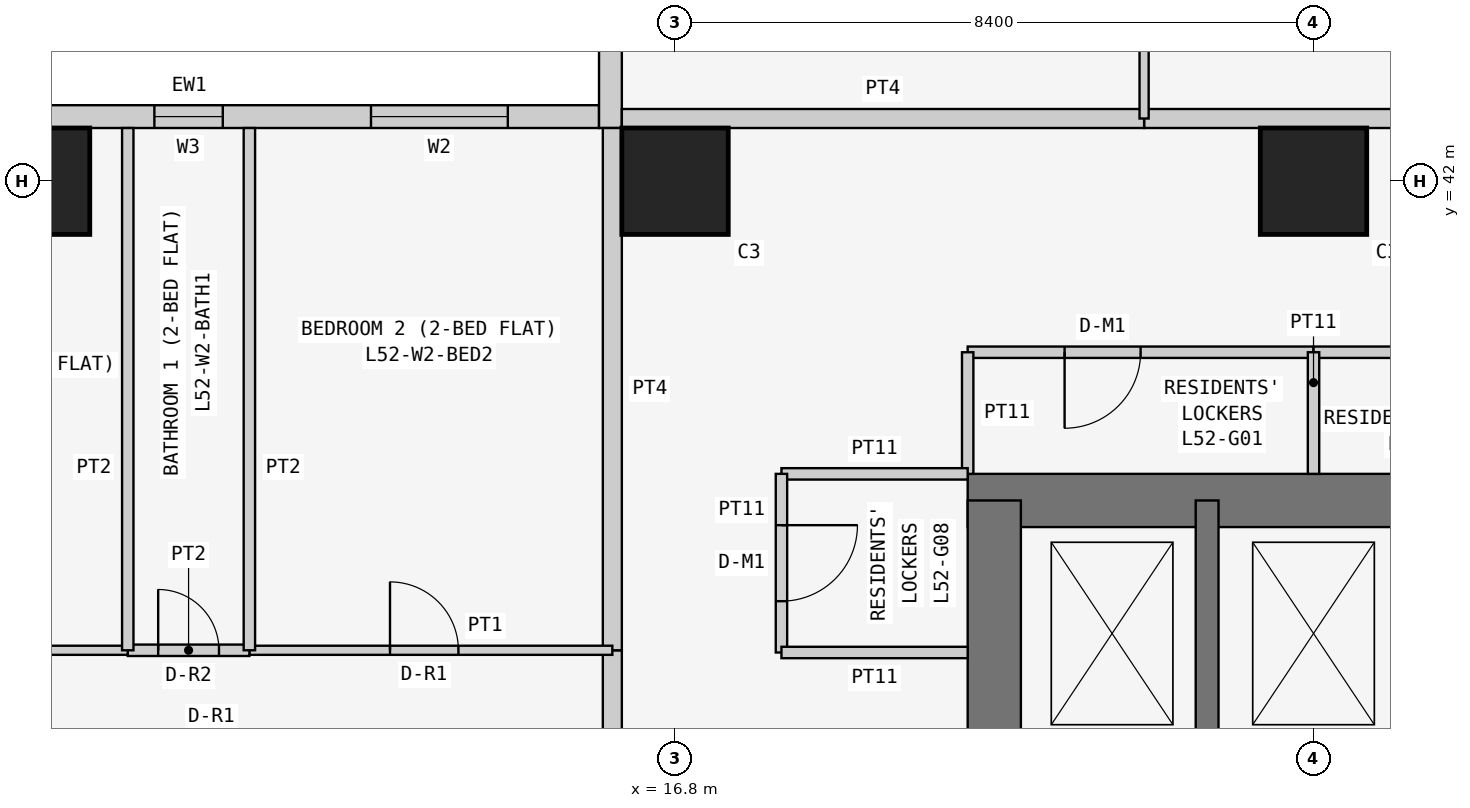
"""IFC4 building model, lengths in metres.
Left out: names, types, materials, properties, quantities, classifications, styles, units other than length and angle.
Written with IfcOpenShell. Run it as: python <this file> out.ifc"""

import sys

from ifc_helpers import new_model, si_unit, direction, frame, frame_2d, origin, origin_2d, place, context, subcontext, project, spatial, rectangle, extrude, element, fill, save


model = new_model("IFC4")
c1 = context("Model", 3, precision=1e-05, world=origin(), true_north=direction((0.0, 1.0)))
c2 = subcontext(c1, "Body", "Model", "MODEL_VIEW")
j1 = project(units=[si_unit("LENGTHUNIT", "METRE"), si_unit("PLANEANGLEUNIT", "RADIAN")], contexts=[c1])
p1 = place(None, origin())
s1 = spatial("IfcSite", under=j1, at=p1, CompositionType="ELEMENT")
p2 = place(p1, origin())
s2 = spatial("IfcBuilding", under=s1, at=p2, CompositionType="ELEMENT")
p3 = place(p2, frame((0.0, 0.0, 201.3)))
s3 = spatial("IfcBuildingStorey", under=s2, at=p3, CompositionType="ELEMENT", Elevation=201.3)
for number, where, z_axis, x_axis in (
    (1, (8.4, 42.0, 0.0), (0.0, 0.0, 1.0), (1.0, 0.0, 0.0)),
    (2, (16.8, 42.0, 0.0), (0.0, 0.0, 1.0), (1.0, 0.0, 0.0)),
    (3, (25.2, 42.0, 0.0), (0.0, 0.0, 1.0), (1.0, 0.0, 0.0)),
):
    element("IfcColumn", number, at=place(p3, frame(where, z_axis=z_axis, x_axis=x_axis)), inside=s3, PredefinedType="COLUMN", context=c2, shape_type="SweptSolid", body=[
        extrude(rectangle(XDim=1.4, YDim=1.4, at=origin_2d()), origin(), (0.0, 0.0, 1.0), 3.6),
    ])
p4 = place(p3, frame((37.8, 37.8, 0.0), z_axis=(0.0, 0.0, 1.0), x_axis=(-1.0, 0.0, 0.0)))
e4 = element("IfcWall", 4, at=p4, inside=s3, PredefinedType="SHEAR", context=c2, shape_type="SweptSolid", body=[
    extrude(rectangle(XDim=17.15, YDim=0.7, at=frame_2d((8.575, 0.0))), origin(), (0.0, 0.0, 1.0), 3.6),
])
p5 = place(p3, frame((21.0, 37.8, 0.0), z_axis=(0.0, 0.0, 1.0), x_axis=(0.0, -1.0, 0.0)))
e5 = element("IfcWall", 5, at=p5, inside=s3, PredefinedType="SHEAR", context=c2, shape_type="SweptSolid", body=[
    extrude(rectangle(XDim=17.15, YDim=0.7, at=frame_2d((8.575, 0.0))), origin(), (0.0, 0.0, 1.0), 3.6),
])
p6 = place(p5, frame((5.4, 0.0, 0.0)))
e6 = element("IfcOpeningElement", 6, at=p6, cuts=e5, PredefinedType="OPENING", context=c2, shape_type="SweptSolid", body=[
    extrude(rectangle(XDim=1.2, YDim=2.1, at=frame_2d((0.6, 1.05))), frame((0.0, 0.36, 0.0), z_axis=(0.0, -1.0, 0.0), x_axis=(1.0, 0.0, 0.0)), (0.0, 0.0, 1.0), 0.72),
])
p7 = place(p3, frame((23.8, 34.6, 0.0), z_axis=(0.0, 0.0, 1.0), x_axis=(0.0, 1.0, 0.0)))
e7 = element("IfcWall", 7, at=p7, inside=s3, PredefinedType="SHEAR", context=c2, shape_type="SweptSolid", body=[
    extrude(rectangle(XDim=3.2, YDim=0.3, at=frame_2d((1.6, 0.0))), origin(), (0.0, 0.0, 1.0), 3.6),
])
p8 = place(p3, frame((15.8, 42.85, 0.0), z_axis=(0.0, 0.0, 1.0), x_axis=(-1.0, 0.0, 0.0)))
e8 = element("IfcWall", 8, at=p8, inside=s3, PredefinedType="SOLIDWALL", context=c2, shape_type="SweptSolid", body=[
    extrude(rectangle(XDim=15.4, YDim=0.3, at=frame_2d((7.7, 0.0))), origin(), (0.0, 0.0, 1.0), 3.45),
])
p9 = place(p8, frame((1.2, 0.0, 0.9)))
e9 = element("IfcOpeningElement", 9, at=p9, cuts=e8, PredefinedType="OPENING", context=c2, shape_type="SweptSolid", body=[
    extrude(rectangle(XDim=1.8, YDim=1.5, at=frame_2d((0.9, 0.75))), frame((0.0, 0.16, 0.0), z_axis=(0.0, -1.0, 0.0), x_axis=(1.0, 0.0, 0.0)), (0.0, 0.0, 1.0), 0.32),
])
p10 = place(p8, frame((4.95, 0.0, 1.5)))
e10 = element("IfcOpeningElement", 10, at=p10, cuts=e8, PredefinedType="OPENING", context=c2, shape_type="SweptSolid", body=[
    extrude(rectangle(XDim=0.9, YDim=0.7, at=frame_2d((0.45, 0.35))), frame((0.0, 0.16, 0.0), z_axis=(0.0, -1.0, 0.0), x_axis=(1.0, 0.0, 0.0)), (0.0, 0.0, 1.0), 0.32),
])
p11 = place(p8, frame((8.5, 0.0, 0.9)))
e11 = element("IfcOpeningElement", 11, at=p11, cuts=e8, PredefinedType="OPENING", context=c2, shape_type="SweptSolid", body=[
    extrude(rectangle(XDim=1.8, YDim=1.5, at=frame_2d((0.9, 0.75))), frame((0.0, 0.16, 0.0), z_axis=(0.0, -1.0, 0.0), x_axis=(1.0, 0.0, 0.0)), (0.0, 0.0, 1.0), 0.32),
])
p12 = place(p8, frame((12.5, 0.0, 0.0)))
e12 = element("IfcOpeningElement", 12, at=p12, cuts=e8, PredefinedType="OPENING", context=c2, shape_type="SweptSolid", body=[
    extrude(rectangle(XDim=0.9, YDim=2.4, at=frame_2d((0.45, 1.2))), frame((0.0, 0.16, 0.0), z_axis=(0.0, -1.0, 0.0), x_axis=(1.0, 0.0, 0.0)), (0.0, 0.0, 1.0), 0.32),
])
p13 = place(p8, frame((13.5, 0.0, 0.9)))
e13 = element("IfcOpeningElement", 13, at=p13, cuts=e8, PredefinedType="OPENING", context=c2, shape_type="SweptSolid", body=[
    extrude(rectangle(XDim=1.2, YDim=1.5, at=frame_2d((0.6, 0.75))), frame((0.0, 0.16, 0.0), z_axis=(0.0, -1.0, 0.0), x_axis=(1.0, 0.0, 0.0)), (0.0, 0.0, 1.0), 0.32),
])
p14 = place(p3, frame((15.95, 50.0, 0.0), z_axis=(0.0, 0.0, 1.0), x_axis=(0.0, -1.0, 0.0)))
e14 = element("IfcWall", 14, at=p14, inside=s3, PredefinedType="SOLIDWALL", context=c2, shape_type="SweptSolid", body=[
    extrude(rectangle(XDim=7.3, YDim=0.3, at=frame_2d((3.65, 0.0))), origin(), (0.0, 0.0, 1.0), 3.45),
])
p15 = place(p14, frame((3.1, 0.0, 0.9)))
e15 = element("IfcOpeningElement", 15, at=p15, cuts=e14, PredefinedType="OPENING", context=c2, shape_type="SweptSolid", body=[
    extrude(rectangle(XDim=2.4, YDim=1.5, at=frame_2d((1.2, 0.75))), frame((0.0, 0.16, 0.0), z_axis=(0.0, -1.0, 0.0), x_axis=(1.0, 0.0, 0.0)), (0.0, 0.0, 1.0), 0.32),
])
p16 = place(p14, frame((0.75, 0.0, 0.9)))
e16 = element("IfcOpeningElement", 16, at=p16, cuts=e14, PredefinedType="OPENING", context=c2, shape_type="SweptSolid", body=[
    extrude(rectangle(XDim=1.2, YDim=1.5, at=frame_2d((0.6, 0.75))), frame((0.0, 0.16, 0.0), z_axis=(0.0, -1.0, 0.0), x_axis=(1.0, 0.0, 0.0)), (0.0, 0.0, 1.0), 0.32),
])
p17 = place(p3, frame((25.2, 39.75, 0.0), z_axis=(0.0, 0.0, 1.0), x_axis=(-1.0, 0.0, 0.0)))
e17 = element("IfcWall", 17, at=p17, inside=s3, PredefinedType="PARTITIONING", context=c2, shape_type="SweptSolid", body=[
    extrude(rectangle(XDim=4.55, YDim=0.15, at=frame_2d((2.275, 0.0))), origin(), (0.0, 0.0, 1.0), 3.45),
])
p18 = place(p17, frame((2.275, 0.0, 0.0)))
e18 = element("IfcOpeningElement", 18, at=p18, cuts=e17, PredefinedType="OPENING", context=c2, shape_type="SweptSolid", body=[
    extrude(rectangle(XDim=1.0, YDim=2.1, at=frame_2d((0.5, 1.05))), frame((0.0, 0.085, 0.0), z_axis=(0.0, -1.0, 0.0), x_axis=(1.0, 0.0, 0.0)), (0.0, 0.0, 1.0), 0.17),
])
p19 = place(p3, frame((20.65, 39.75, 0.0), z_axis=(0.0, 0.0, 1.0), x_axis=(0.0, -1.0, 0.0)))
e19 = element("IfcWall", 19, at=p19, inside=s3, PredefinedType="PARTITIONING", context=c2, shape_type="SweptSolid", body=[
    extrude(rectangle(XDim=1.6, YDim=0.15, at=frame_2d((0.8, 0.0))), origin(), (0.0, 0.0, 1.0), 3.45),
])
p20 = place(p3, frame((32.6, 39.75, 0.0), z_axis=(0.0, 0.0, 1.0), x_axis=(-1.0, 0.0, 0.0)))
e20 = element("IfcWall", 20, at=p20, inside=s3, PredefinedType="PARTITIONING", context=c2, shape_type="SweptSolid", body=[
    extrude(rectangle(XDim=7.4, YDim=0.15, at=frame_2d((3.7, 0.0))), origin(), (0.0, 0.0, 1.0), 3.45),
])
p21 = place(p20, frame((2.7, 0.0, 0.0)))
e21 = element("IfcOpeningElement", 21, at=p21, cuts=e20, PredefinedType="OPENING", context=c2, shape_type="SweptSolid", body=[
    extrude(rectangle(XDim=1.0, YDim=2.1, at=frame_2d((0.5, 1.05))), frame((0.0, 0.085, 0.0), z_axis=(0.0, -1.0, 0.0), x_axis=(1.0, 0.0, 0.0)), (0.0, 0.0, 1.0), 0.17),
])
p22 = place(p3, frame((20.65, 38.15, 0.0), z_axis=(0.0, 0.0, 1.0), x_axis=(-1.0, 0.0, 0.0)))
e22 = element("IfcWall", 22, at=p22, inside=s3, PredefinedType="PARTITIONING", context=c2, shape_type="SweptSolid", body=[
    extrude(rectangle(XDim=2.45, YDim=0.15, at=frame_2d((1.225, 0.0))), origin(), (0.0, 0.0, 1.0), 3.45),
])
p23 = place(p3, frame((18.2, 38.15, 0.0), z_axis=(0.0, 0.0, 1.0), x_axis=(0.0, -1.0, 0.0)))
e23 = element("IfcWall", 23, at=p23, inside=s3, PredefinedType="PARTITIONING", context=c2, shape_type="SweptSolid", body=[
    extrude(rectangle(XDim=2.35, YDim=0.15, at=frame_2d((1.175, 0.0))), origin(), (0.0, 0.0, 1.0), 3.45),
])
p24 = place(p23, frame((0.675, 0.0, 0.0)))
e24 = element("IfcOpeningElement", 24, at=p24, cuts=e23, PredefinedType="OPENING", context=c2, shape_type="SweptSolid", body=[
    extrude(rectangle(XDim=1.0, YDim=2.1, at=frame_2d((0.5, 1.05))), frame((0.0, 0.085, 0.0), z_axis=(0.0, -1.0, 0.0), x_axis=(1.0, 0.0, 0.0)), (0.0, 0.0, 1.0), 0.17),
])
p25 = place(p3, frame((18.2, 35.8, 0.0), z_axis=(0.0, 0.0, 1.0), x_axis=(1.0, 0.0, 0.0)))
e25 = element("IfcWall", 25, at=p25, inside=s3, PredefinedType="PARTITIONING", context=c2, shape_type="SweptSolid", body=[
    extrude(rectangle(XDim=2.45, YDim=0.15, at=frame_2d((1.225, 0.0))), origin(), (0.0, 0.0, 1.0), 3.45),
])
p26 = place(p3, frame((22.971, 42.825, 0.0), z_axis=(0.0, 0.0, 1.0), x_axis=(1.0, 0.0, 0.0)))
e26 = element("IfcWall", 26, at=p26, inside=s3, PredefinedType="PARTITIONING", context=c2, shape_type="SweptSolid", body=[
    extrude(rectangle(XDim=6.429, YDim=0.25, at=frame_2d((3.214, 0.0))), origin(), (0.0, 0.0, 1.0), 3.45),
])
p27 = place(p26, frame((4.929, 0.0, 0.0)))
e27 = element("IfcOpeningElement", 27, at=p27, cuts=e26, PredefinedType="OPENING", context=c2, shape_type="SweptSolid", body=[
    extrude(rectangle(XDim=1.0, YDim=2.1, at=frame_2d((0.5, 1.05))), frame((0.0, 0.135, 0.0), z_axis=(0.0, -1.0, 0.0), x_axis=(1.0, 0.0, 0.0)), (0.0, 0.0, 1.0), 0.27),
])
p28 = place(p3, frame((16.1, 42.825, 0.0), z_axis=(0.0, 0.0, 1.0), x_axis=(1.0, 0.0, 0.0)))
e28 = element("IfcWall", 28, at=p28, inside=s3, PredefinedType="PARTITIONING", context=c2, shape_type="SweptSolid", body=[
    extrude(rectangle(XDim=6.871, YDim=0.25, at=frame_2d((3.436, 0.0))), origin(), (0.0, 0.0, 1.0), 3.45),
])
p29 = place(p3, frame((15.975, 34.629, 0.0), z_axis=(0.0, 0.0, 1.0), x_axis=(0.0, 1.0, 0.0)))
e29 = element("IfcWall", 29, at=p29, inside=s3, PredefinedType="PARTITIONING", context=c2, shape_type="SweptSolid", body=[
    extrude(rectangle(XDim=1.2, YDim=0.25, at=frame_2d((0.6, 0.0))), origin(), (0.0, 0.0, 1.0), 3.45),
])
p30 = place(p3, frame((15.975, 35.829, 0.0), z_axis=(0.0, 0.0, 1.0), x_axis=(0.0, 1.0, 0.0)))
e30 = element("IfcWall", 30, at=p30, inside=s3, PredefinedType="PARTITIONING", context=c2, shape_type="SweptSolid", body=[
    extrude(rectangle(XDim=6.871, YDim=0.25, at=frame_2d((3.436, 0.0))), origin(), (0.0, 0.0, 1.0), 3.45),
])
p31 = place(p3, frame((25.2, 38.15, 0.0), z_axis=(0.0, 0.0, 1.0), x_axis=(0.0, 1.0, 0.0)))
e31 = element("IfcWall", 31, at=p31, inside=s3, PredefinedType="PARTITIONING", context=c2, shape_type="SweptSolid", body=[
    extrude(rectangle(XDim=1.6, YDim=0.15, at=frame_2d((0.8, 0.0))), origin(), (0.0, 0.0, 1.0), 2.767),
])
p32 = place(p3, frame((22.971, 42.825, 0.0), z_axis=(0.0, 0.0, 1.0), x_axis=(0.0, 1.0, 0.0)))
e32 = element("IfcWall", 32, at=p32, inside=s3, PredefinedType="PARTITIONING", context=c2, shape_type="SweptSolid", body=[
    extrude(rectangle(XDim=4.975, YDim=0.12, at=frame_2d((2.488, 0.0))), origin(), (0.0, 0.0, 1.0), 3.45),
])
p33 = place(p32, frame((2.225, 0.0, 0.0)))
e33 = element("IfcOpeningElement", 33, at=p33, cuts=e32, PredefinedType="OPENING", context=c2, shape_type="SweptSolid", body=[
    extrude(rectangle(XDim=0.9, YDim=2.1, at=frame_2d((0.45, 1.05))), frame((0.0, 0.07, 0.0), z_axis=(0.0, -1.0, 0.0), x_axis=(1.0, 0.0, 0.0)), (0.0, 0.0, 1.0), 0.14),
])
p34 = place(p3, frame((11.2, 35.829, 0.0), z_axis=(0.0, 0.0, 1.0), x_axis=(1.0, 0.0, 0.0)))
e34 = element("IfcWall", 34, at=p34, inside=s3, PredefinedType="PARTITIONING", context=c2, shape_type="SweptSolid", body=[
    extrude(rectangle(XDim=4.775, YDim=0.12, at=frame_2d((2.388, 0.0))), origin(), (0.0, 0.0, 1.0), 3.45),
])
p35 = place(p34, frame((1.85, 0.0, 0.0)))
e35 = element("IfcOpeningElement", 35, at=p35, cuts=e34, PredefinedType="OPENING", context=c2, shape_type="SweptSolid", body=[
    extrude(rectangle(XDim=0.9, YDim=2.1, at=frame_2d((0.45, 1.05))), frame((0.0, 0.07, 0.0), z_axis=(0.0, -1.0, 0.0), x_axis=(1.0, 0.0, 0.0)), (0.0, 0.0, 1.0), 0.14),
])
p36 = place(p3, frame((9.6, 35.829, 0.0), z_axis=(0.0, 0.0, 1.0), x_axis=(1.0, 0.0, 0.0)))
e36 = element("IfcWall", 36, at=p36, inside=s3, PredefinedType="PARTITIONING", context=c2, shape_type="SweptSolid", body=[
    extrude(rectangle(XDim=1.6, YDim=0.15, at=frame_2d((0.8, 0.0))), origin(), (0.0, 0.0, 1.0), 3.45),
])
p37 = place(p36, frame((0.4, 0.0, 0.0)))
e37 = element("IfcOpeningElement", 37, at=p37, cuts=e36, PredefinedType="OPENING", context=c2, shape_type="SweptSolid", body=[
    extrude(rectangle(XDim=0.8, YDim=2.1, at=frame_2d((0.4, 1.05))), frame((0.0, 0.085, 0.0), z_axis=(0.0, -1.0, 0.0), x_axis=(1.0, 0.0, 0.0)), (0.0, 0.0, 1.0), 0.17),
])
p38 = place(p3, frame((5.8, 35.829, 0.0), z_axis=(0.0, 0.0, 1.0), x_axis=(1.0, 0.0, 0.0)))
e38 = element("IfcWall", 38, at=p38, inside=s3, PredefinedType="PARTITIONING", context=c2, shape_type="SweptSolid", body=[
    extrude(rectangle(XDim=3.8, YDim=0.12, at=frame_2d((1.9, 0.0))), origin(), (0.0, 0.0, 1.0), 3.45),
])
p39 = place(p38, frame((0.55, 0.0, 0.0)))
e39 = element("IfcOpeningElement", 39, at=p39, cuts=e38, PredefinedType="OPENING", context=c2, shape_type="SweptSolid", body=[
    extrude(rectangle(XDim=0.9, YDim=2.1, at=frame_2d((0.45, 1.05))), frame((0.0, 0.07, 0.0), z_axis=(0.0, -1.0, 0.0), x_axis=(1.0, 0.0, 0.0)), (0.0, 0.0, 1.0), 0.14),
])
for number, where, z_axis, x_axis in (
    (40, (11.2, 35.829, 0.0), (0.0, 0.0, 1.0), (0.0, 1.0, 0.0)),
    (41, (9.6, 35.829, 0.0), (0.0, 0.0, 1.0), (0.0, 1.0, 0.0)),
):
    element("IfcWall", number, at=place(p3, frame(where, z_axis=z_axis, x_axis=x_axis)), inside=s3, PredefinedType="PARTITIONING", context=c2, shape_type="SweptSolid", body=[
        extrude(rectangle(XDim=6.871, YDim=0.15, at=frame_2d((3.436, 0.0))), origin(), (0.0, 0.0, 1.0), 3.45),
    ])
p40 = place(p9, origin())
e42 = element("IfcWindow", 42, at=p40, inside=s3, PartitioningType="SINGLE_PANEL", PredefinedType="WINDOW", context=c2, shape_type="SweptSolid", body=[
    extrude(rectangle(XDim=1.8, YDim=1.5, at=frame_2d((0.9, 0.75))), frame((0.0, 0.03, 0.0), z_axis=(0.0, -1.0, 0.0), x_axis=(1.0, 0.0, 0.0)), (0.0, 0.0, 1.0), 0.06),
])
fill(e9, e42)
p41 = place(p10, origin())
e43 = element("IfcWindow", 43, at=p41, inside=s3, PartitioningType="SINGLE_PANEL", PredefinedType="WINDOW", context=c2, shape_type="SweptSolid", body=[
    extrude(rectangle(XDim=0.9, YDim=0.7, at=frame_2d((0.45, 0.35))), frame((0.0, 0.03, 0.0), z_axis=(0.0, -1.0, 0.0), x_axis=(1.0, 0.0, 0.0)), (0.0, 0.0, 1.0), 0.06),
])
fill(e10, e43)
p42 = place(p18, origin())
e44 = element("IfcDoor", 44, at=p42, inside=s3, OperationType="SINGLE_SWING_RIGHT", PredefinedType="DOOR", context=c2, shape_type="SweptSolid", body=[
    extrude(rectangle(XDim=1.0, YDim=2.1, at=frame_2d((0.5, 1.05))), frame((0.0, 0.025, 0.0), z_axis=(0.0, -1.0, 0.0), x_axis=(1.0, 0.0, 0.0)), (0.0, 0.0, 1.0), 0.05),
])
fill(e18, e44)
p43 = place(p24, origin())
e45 = element("IfcDoor", 45, at=p43, inside=s3, OperationType="SINGLE_SWING_LEFT", PredefinedType="DOOR", context=c2, shape_type="SweptSolid", body=[
    extrude(rectangle(XDim=1.0, YDim=2.1, at=frame_2d((0.5, 1.05))), frame((0.0, 0.025, 0.0), z_axis=(0.0, -1.0, 0.0), x_axis=(1.0, 0.0, 0.0)), (0.0, 0.0, 1.0), 0.05),
])
fill(e24, e45)
p44 = place(p35, origin())
e46 = element("IfcDoor", 46, at=p44, inside=s3, OperationType="SINGLE_SWING_LEFT", PredefinedType="DOOR", context=c2, shape_type="SweptSolid", body=[
    extrude(rectangle(XDim=0.9, YDim=2.1, at=frame_2d((0.45, 1.05))), frame((0.0, 0.025, 0.0), z_axis=(0.0, -1.0, 0.0), x_axis=(1.0, 0.0, 0.0)), (0.0, 0.0, 1.0), 0.05),
])
fill(e35, e46)
p45 = place(p37, origin())
e47 = element("IfcDoor", 47, at=p45, inside=s3, OperationType="SINGLE_SWING_LEFT", PredefinedType="DOOR", context=c2, shape_type="SweptSolid", body=[
    extrude(rectangle(XDim=0.8, YDim=2.1, at=frame_2d((0.4, 1.05))), frame((0.0, 0.025, 0.0), z_axis=(0.0, -1.0, 0.0), x_axis=(1.0, 0.0, 0.0)), (0.0, 0.0, 1.0), 0.05),
])
fill(e37, e47)
save(model, sys.argv[1])
